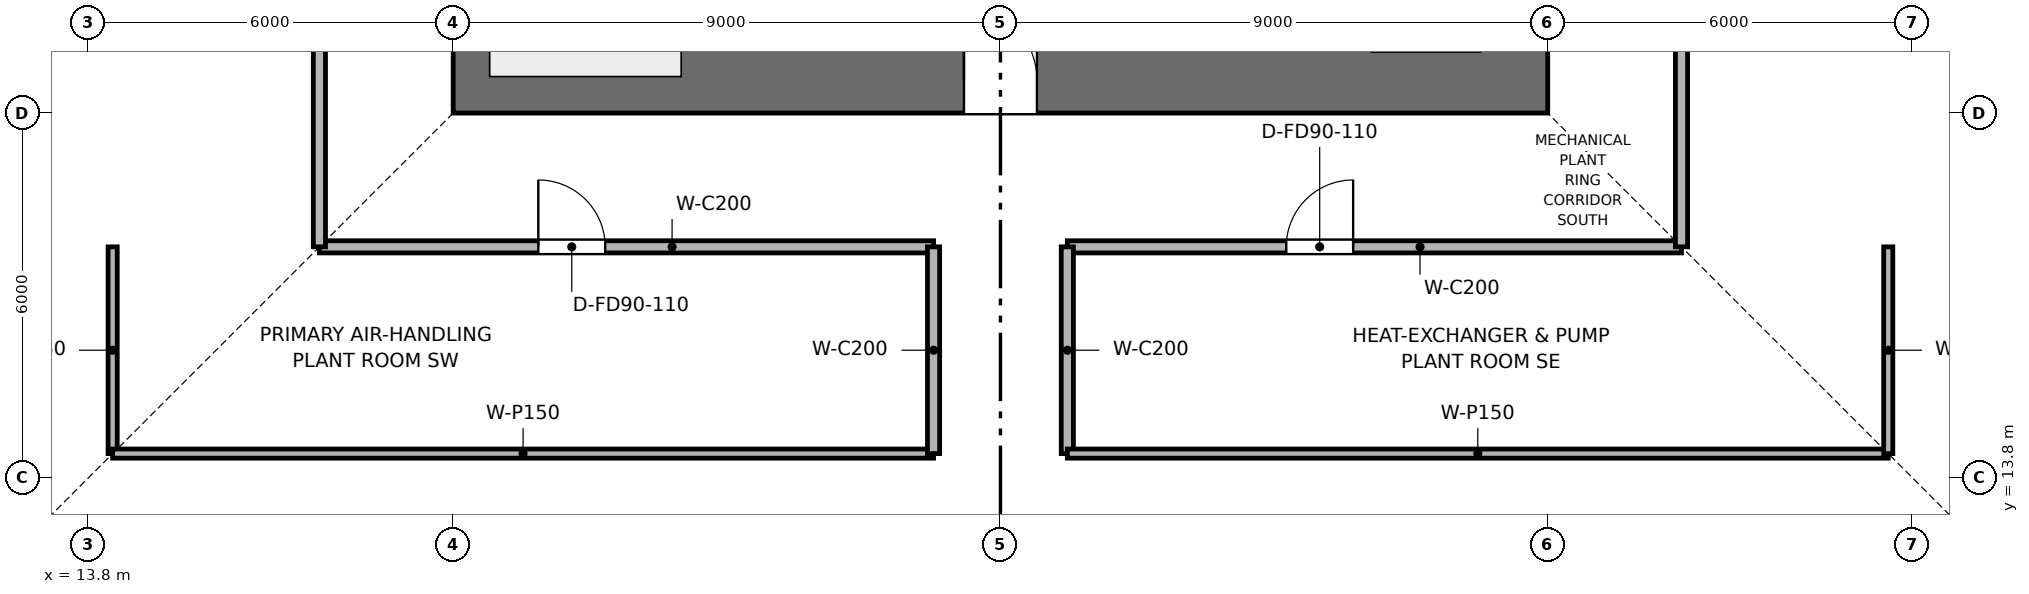
"""IFC4 building model, lengths in metres.
Left out: names, types, materials, properties, quantities, classifications, styles, units other than length and angle.
Written with IfcOpenShell. Run it as: python <this file> out.ifc"""

import sys

from ifc_helpers import new_model, si_unit, direction, frame, frame_2d, origin, place, context, subcontext, project, spatial, rectangle, extrude, element, fill, save


model = new_model("IFC4")
c1 = context("Model", 3, precision=1e-05, world=origin(), true_north=direction((0.0, 1.0)))
c2 = subcontext(c1, "Body", "Model", "MODEL_VIEW")
j1 = project(units=[si_unit("LENGTHUNIT", "METRE"), si_unit("PLANEANGLEUNIT", "RADIAN")], contexts=[c1])
p1 = place(None, origin())
s1 = spatial("IfcSite", under=j1, at=p1, CompositionType="ELEMENT")
p2 = place(p1, origin())
s2 = spatial("IfcBuilding", under=s1, at=p2, CompositionType="ELEMENT")
p3 = place(p2, frame((0.0, 0.0, 24.0)))
s3 = spatial("IfcBuildingStorey", under=s2, at=p3, CompositionType="ELEMENT", Elevation=24.0)
p4 = place(p3, frame((19.8, 20.35, 0.0), z_axis=(0.0, 0.0, 1.0), x_axis=(1.0, 0.0, 0.0)))
e1 = element("IfcWall", 1, at=p4, inside=s3, PredefinedType="SHEAR", context=c2, shape_type="SweptSolid", body=[
    extrude(rectangle(XDim=18.0, YDim=1.1, at=frame_2d((9.0, 0.0))), origin(), (0.0, 0.0, 1.0), 6.0),
])
p5 = place(p4, frame((8.4, 0.0, 0.0)))
e2 = element("IfcOpeningElement", 2, at=p5, cuts=e1, PredefinedType="OPENING", context=c2, shape_type="SweptSolid", body=[
    extrude(rectangle(XDim=1.2, YDim=2.2, at=frame_2d((0.6, 1.1))), frame((0.0, 0.56, 0.0), z_axis=(0.0, -1.0, 0.0), x_axis=(1.0, 0.0, 0.0)), (0.0, 0.0, 1.0), 1.12),
])
p6 = place(p3, frame((17.6, 17.6, 0.0), z_axis=(0.0, 0.0, 1.0), x_axis=(1.0, 0.0, 0.0)))
e3 = element("IfcWall", 3, at=p6, inside=s3, PredefinedType="PARTITIONING", context=c2, shape_type="SweptSolid", body=[
    extrude(rectangle(XDim=10.1, YDim=0.2, at=frame_2d((5.05, 0.0))), origin(), (0.0, 0.0, 1.0), 5.185),
])
p7 = place(p6, frame((3.6, 0.0, 0.0)))
e4 = element("IfcOpeningElement", 4, at=p7, cuts=e3, PredefinedType="OPENING", context=c2, shape_type="SweptSolid", body=[
    extrude(rectangle(XDim=1.1, YDim=2.15, at=frame_2d((0.55, 1.075))), frame((0.0, 0.11, 0.0), z_axis=(0.0, -1.0, 0.0), x_axis=(1.0, 0.0, 0.0)), (0.0, 0.0, 1.0), 0.22),
])
p8 = place(p3, frame((29.9, 17.6, 0.0), z_axis=(0.0, 0.0, 1.0), x_axis=(1.0, 0.0, 0.0)))
e5 = element("IfcWall", 5, at=p8, inside=s3, PredefinedType="PARTITIONING", context=c2, shape_type="SweptSolid", body=[
    extrude(rectangle(XDim=10.1, YDim=0.2, at=frame_2d((5.05, 0.0))), origin(), (0.0, 0.0, 1.0), 5.185),
])
p9 = place(p8, frame((3.6, 0.0, 0.0)))
e6 = element("IfcOpeningElement", 6, at=p9, cuts=e5, PredefinedType="OPENING", context=c2, shape_type="SweptSolid", body=[
    extrude(rectangle(XDim=1.1, YDim=2.15, at=frame_2d((0.55, 1.075))), frame((0.0, 0.11, 0.0), z_axis=(0.0, -1.0, 0.0), x_axis=(1.0, 0.0, 0.0)), (0.0, 0.0, 1.0), 0.22),
])
for number, where, z_axis, x_axis in (
    (7, (17.6, 17.6, 0.0), (0.0, 0.0, 1.0), (0.0, 1.0, 0.0)),
    (8, (40.0, 17.6, 0.0), (0.0, 0.0, 1.0), (0.0, 1.0, 0.0)),
):
    element("IfcWall", number, at=place(p3, frame(where, z_axis=z_axis, x_axis=x_axis)), inside=s3, PredefinedType="PARTITIONING", context=c2, shape_type="SweptSolid", body=[
        extrude(rectangle(XDim=10.1, YDim=0.2, at=frame_2d((5.05, 0.0))), origin(), (0.0, 0.0, 1.0), 5.185),
    ])
p10 = place(p3, frame((14.2, 14.2, 0.0), z_axis=(0.0, 0.0, 1.0), x_axis=(0.0, 1.0, 0.0)))
e9 = element("IfcWall", 9, at=p10, inside=s3, PredefinedType="PARTITIONING", context=c2, shape_type="SweptSolid", body=[
    extrude(rectangle(XDim=3.4, YDim=0.15, at=frame_2d((1.7, 0.0))), origin(), (0.0, 0.0, 1.0), 5.75),
])
p11 = place(p3, frame((14.2, 14.2, 0.0), z_axis=(0.0, 0.0, 1.0), x_axis=(1.0, 0.0, 0.0)))
e10 = element("IfcWall", 10, at=p11, inside=s3, PredefinedType="PARTITIONING", context=c2, shape_type="SweptSolid", body=[
    extrude(rectangle(XDim=13.5, YDim=0.15, at=frame_2d((6.75, 0.0))), origin(), (0.0, 0.0, 1.0), 5.185),
])
for number, where, z_axis, x_axis in (
    (11, (27.7, 14.2, 0.0), (0.0, 0.0, 1.0), (0.0, 1.0, 0.0)),
    (12, (29.9, 14.2, 0.0), (0.0, 0.0, 1.0), (0.0, 1.0, 0.0)),
):
    element("IfcWall", number, at=place(p3, frame(where, z_axis=z_axis, x_axis=x_axis)), inside=s3, PredefinedType="PARTITIONING", context=c2, shape_type="SweptSolid", body=[
        extrude(rectangle(XDim=3.4, YDim=0.2, at=frame_2d((1.7, 0.0))), origin(), (0.0, 0.0, 1.0), 5.75),
    ])
p12 = place(p3, frame((29.9, 14.2, 0.0), z_axis=(0.0, 0.0, 1.0), x_axis=(1.0, 0.0, 0.0)))
e13 = element("IfcWall", 13, at=p12, inside=s3, PredefinedType="PARTITIONING", context=c2, shape_type="SweptSolid", body=[
    extrude(rectangle(XDim=13.5, YDim=0.15, at=frame_2d((6.75, 0.0))), origin(), (0.0, 0.0, 1.0), 5.185),
])
p13 = place(p3, frame((43.4, 14.2, 0.0), z_axis=(0.0, 0.0, 1.0), x_axis=(0.0, 1.0, 0.0)))
e14 = element("IfcWall", 14, at=p13, inside=s3, PredefinedType="PARTITIONING", context=c2, shape_type="SweptSolid", body=[
    extrude(rectangle(XDim=3.4, YDim=0.15, at=frame_2d((1.7, 0.0))), origin(), (0.0, 0.0, 1.0), 5.75),
])
p14 = place(p7, origin())
e15 = element("IfcDoor", 15, at=p14, inside=s3, OperationType="SINGLE_SWING_LEFT", PredefinedType="DOOR", context=c2, shape_type="SweptSolid", body=[
    extrude(rectangle(XDim=1.1, YDim=2.15, at=frame_2d((0.55, 1.075))), frame((0.0, 0.025, 0.0), z_axis=(0.0, -1.0, 0.0), x_axis=(1.0, 0.0, 0.0)), (0.0, 0.0, 1.0), 0.05),
])
fill(e4, e15)
p15 = place(p9, origin())
e16 = element("IfcDoor", 16, at=p15, inside=s3, OperationType="SINGLE_SWING_RIGHT", PredefinedType="DOOR", context=c2, shape_type="SweptSolid", body=[
    extrude(rectangle(XDim=1.1, YDim=2.15, at=frame_2d((0.55, 1.075))), frame((0.0, 0.025, 0.0), z_axis=(0.0, -1.0, 0.0), x_axis=(1.0, 0.0, 0.0)), (0.0, 0.0, 1.0), 0.05),
])
fill(e6, e16)
p16 = place(p5, origin())
e17 = element("IfcDoor", 17, at=p16, inside=s3, OperationType="SINGLE_SWING_LEFT", PredefinedType="DOOR", context=c2, shape_type="SweptSolid", body=[
    extrude(rectangle(XDim=1.2, YDim=2.2, at=frame_2d((0.6, 1.1))), frame((0.0, 0.025, 0.0), z_axis=(0.0, -1.0, 0.0), x_axis=(1.0, 0.0, 0.0)), (0.0, 0.0, 1.0), 0.05),
])
fill(e2, e17)
save(model, sys.argv[1])
